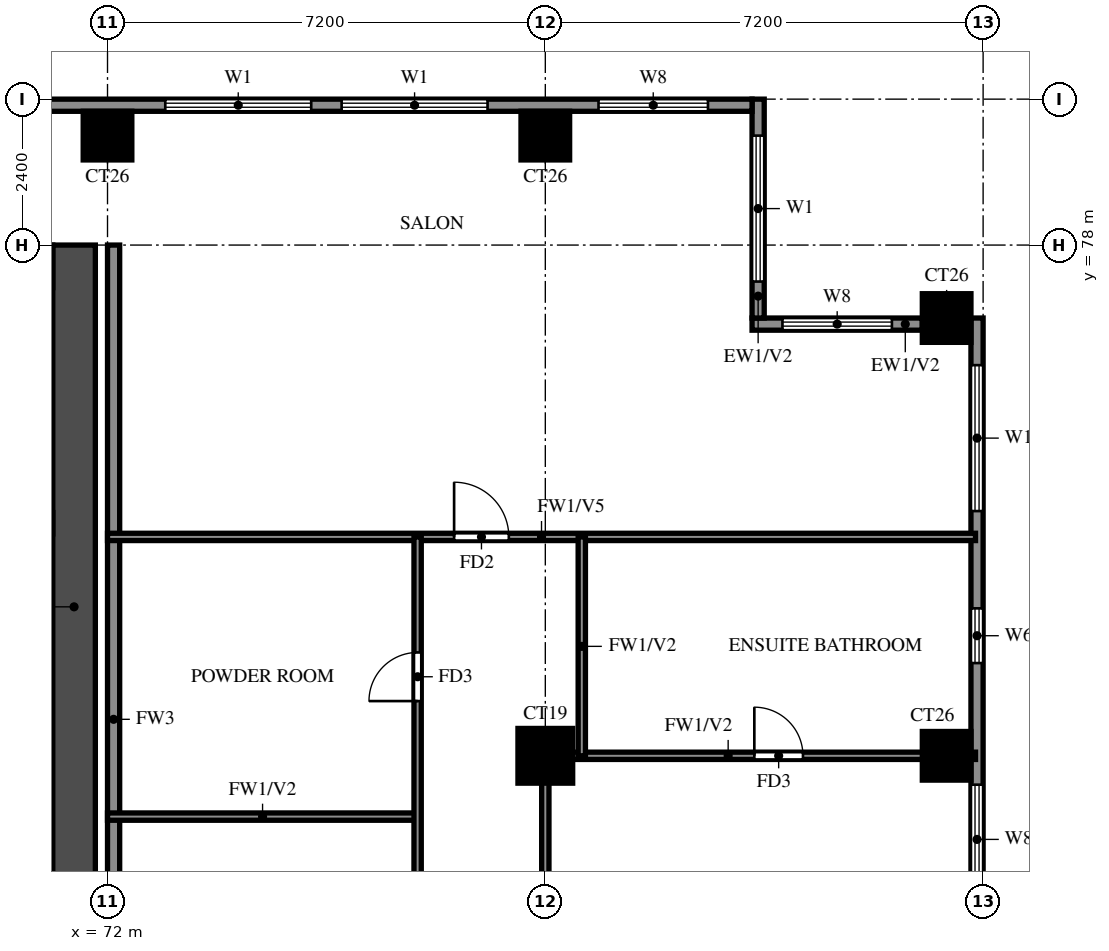
"""IFC4 building model, lengths in metres.
Left out: names, types, materials, properties, quantities, classifications, styles, units other than length and angle.
Written with IfcOpenShell. Run it as: python <this file> out.ifc"""

import sys

from ifc_helpers import new_model, si_unit, direction, frame, frame_2d, origin, origin_2d, place, context, subcontext, project, spatial, rectangle, extrude, source, transform, mapped, element, fill, save


model = new_model("IFC4")
c1 = context("Model", 3, precision=1e-05, world=origin(), true_north=direction((0.0, 1.0)))
c2 = subcontext(c1, "Body", "Model", "MODEL_VIEW")
j1 = project(units=[si_unit("LENGTHUNIT", "METRE"), si_unit("PLANEANGLEUNIT", "RADIAN")], contexts=[c1])
p1 = place(None, origin())
s1 = spatial("IfcSite", under=j1, at=p1, CompositionType="ELEMENT")
p2 = place(p1, origin())
s2 = spatial("IfcBuilding", under=s1, at=p2, CompositionType="ELEMENT")
p3 = place(p2, frame((0.0, 0.0, 174.5)))
s3 = spatial("IfcBuildingStorey", under=s2, at=p3, CompositionType="ELEMENT", Elevation=174.5)
m1 = source(origin(), c2, "Body", "SweptSolid", [
    extrude(rectangle(XDim=0.9, YDim=0.9, at=origin_2d()), origin(), (0.0, 0.0, 1.0), 3.2),
])
p4 = place(p3, frame((79.2, 69.6, 0.0), z_axis=(0.0, 0.0, 1.0), x_axis=(1.0, 0.0, 0.0)))
e1 = element("IfcColumn", 1, at=p4, inside=s3, PredefinedType="COLUMN", context=c2, shape_type="MappedRepresentation", body=[
    mapped(m1, transform((0.0, 0.0, 0.0))),
])
m2 = source(origin(), c2, "Body", "SweptSolid", [
    extrude(rectangle(XDim=0.8, YDim=0.8, at=origin_2d()), origin(), (0.0, 0.0, 1.0), 3.2),
])
for number, where, z_axis, x_axis in (
    (2, (85.8, 69.6, 0.0), (0.0, 0.0, 1.0), (1.0, 0.0, 0.0)),
    (3, (85.8, 76.8, 0.0), (0.0, 0.0, 1.0), (1.0, 0.0, 0.0)),
    (4, (72.0, 79.8, 0.0), (0.0, 0.0, 1.0), (1.0, 0.0, 0.0)),
    (5, (79.2, 79.8, 0.0), (0.0, 0.0, 1.0), (1.0, 0.0, 0.0)),
):
    element("IfcColumn", number, at=place(p3, frame(where, z_axis=z_axis, x_axis=x_axis)), inside=s3, PredefinedType="COLUMN", context=c2, shape_type="MappedRepresentation", body=[
        mapped(m2, transform((0.0, 0.0, 0.0))),
    ])
p5 = place(p3, frame((71.45, 66.1, 0.0), z_axis=(0.0, 0.0, 1.0), x_axis=(0.0, 1.0, 0.0)))
e6 = element("IfcWall", 6, at=p5, inside=s3, PredefinedType="SHEAR", context=c2, shape_type="SweptSolid", body=[
    extrude(rectangle(XDim=11.9, YDim=0.7, at=frame_2d((5.95, 0.0))), origin(), (0.0, 0.0, 1.0), 3.2),
])
p6 = place(p3, frame((29.7, 77.65, 0.0), z_axis=(0.0, 0.0, 1.0), x_axis=(1.0, 0.0, 0.0)))
e7 = element("IfcWall", 7, at=p6, inside=s3, PredefinedType="SHEAR", context=c2, shape_type="SweptSolid", body=[
    extrude(rectangle(XDim=41.4, YDim=0.7, at=frame_2d((20.7, 0.0))), origin(), (0.0, 0.0, 1.0), 3.2),
])
p7 = place(p3, frame((86.3, 48.2, 0.0), z_axis=(0.0, 0.0, 1.0), x_axis=(0.0, 1.0, 0.0)))
e8 = element("IfcWall", 8, at=p7, inside=s3, PredefinedType="SOLIDWALL", context=c2, shape_type="SweptSolid", body=[
    extrude(rectangle(XDim=28.6, YDim=0.2, at=frame_2d((14.3, 0.0))), origin(), (0.0, 0.0, 1.0), 3.2),
])
p8 = place(p7, frame((15.1, 0.0, 0.0)))
e9 = element("IfcOpeningElement", 9, at=p8, cuts=e8, PredefinedType="OPENING", context=c2, shape_type="SweptSolid", body=[
    extrude(rectangle(XDim=1.8, YDim=2.4, at=frame_2d((0.9, 1.2))), frame((0.0, 0.11, 0.0), z_axis=(0.0, -1.0, 0.0), x_axis=(1.0, 0.0, 0.0)), (0.0, 0.0, 1.0), 0.22),
])
p9 = place(p7, frame((0.783, 0.0, 0.6)))
e10 = element("IfcOpeningElement", 10, at=p9, cuts=e8, PredefinedType="OPENING", context=c2, shape_type="SweptSolid", body=[
    extrude(rectangle(XDim=2.4, YDim=2.4, at=frame_2d((1.2, 1.2))), frame((0.0, 0.11, 0.0), z_axis=(0.0, -1.0, 0.0), x_axis=(1.0, 0.0, 0.0)), (0.0, 0.0, 1.0), 0.22),
])
p10 = place(p7, frame((3.667, 0.0, 0.6)))
e11 = element("IfcOpeningElement", 11, at=p10, cuts=e8, PredefinedType="OPENING", context=c2, shape_type="SweptSolid", body=[
    extrude(rectangle(XDim=2.4, YDim=2.4, at=frame_2d((1.2, 1.2))), frame((0.0, 0.11, 0.0), z_axis=(0.0, -1.0, 0.0), x_axis=(1.0, 0.0, 0.0)), (0.0, 0.0, 1.0), 0.22),
])
p11 = place(p7, frame((7.775, 0.0, 0.6)))
e12 = element("IfcOpeningElement", 12, at=p11, cuts=e8, PredefinedType="OPENING", context=c2, shape_type="SweptSolid", body=[
    extrude(rectangle(XDim=2.4, YDim=2.4, at=frame_2d((1.2, 1.2))), frame((0.0, 0.11, 0.0), z_axis=(0.0, -1.0, 0.0), x_axis=(1.0, 0.0, 0.0)), (0.0, 0.0, 1.0), 0.22),
])
p12 = place(p7, frame((10.75, 0.0, 0.6)))
e13 = element("IfcOpeningElement", 13, at=p12, cuts=e8, PredefinedType="OPENING", context=c2, shape_type="SweptSolid", body=[
    extrude(rectangle(XDim=0.9, YDim=2.4, at=frame_2d((0.45, 1.2))), frame((0.0, 0.11, 0.0), z_axis=(0.0, -1.0, 0.0), x_axis=(1.0, 0.0, 0.0)), (0.0, 0.0, 1.0), 0.22),
])
p13 = place(p7, frame((12.525, 0.0, 0.6)))
e14 = element("IfcOpeningElement", 14, at=p13, cuts=e8, PredefinedType="OPENING", context=c2, shape_type="SweptSolid", body=[
    extrude(rectangle(XDim=1.2, YDim=2.4, at=frame_2d((0.6, 1.2))), frame((0.0, 0.11, 0.0), z_axis=(0.0, -1.0, 0.0), x_axis=(1.0, 0.0, 0.0)), (0.0, 0.0, 1.0), 0.22),
])
p14 = place(p7, frame((17.35, 0.0, 0.6)))
e15 = element("IfcOpeningElement", 15, at=p14, cuts=e8, PredefinedType="OPENING", context=c2, shape_type="SweptSolid", body=[
    extrude(rectangle(XDim=0.9, YDim=2.4, at=frame_2d((0.45, 1.2))), frame((0.0, 0.11, 0.0), z_axis=(0.0, -1.0, 0.0), x_axis=(1.0, 0.0, 0.0)), (0.0, 0.0, 1.0), 0.22),
])
p15 = place(p7, frame((19.125, 0.0, 0.6)))
e16 = element("IfcOpeningElement", 16, at=p15, cuts=e8, PredefinedType="OPENING", context=c2, shape_type="SweptSolid", body=[
    extrude(rectangle(XDim=1.8, YDim=2.4, at=frame_2d((0.9, 1.2))), frame((0.0, 0.11, 0.0), z_axis=(0.0, -1.0, 0.0), x_axis=(1.0, 0.0, 0.0)), (0.0, 0.0, 1.0), 0.22),
])
p16 = place(p7, frame((22.925, 0.0, 1.5)))
e17 = element("IfcOpeningElement", 17, at=p16, cuts=e8, PredefinedType="OPENING", context=c2, shape_type="SweptSolid", body=[
    extrude(rectangle(XDim=0.9, YDim=0.9, at=frame_2d((0.45, 0.45))), frame((0.0, 0.11, 0.0), z_axis=(0.0, -1.0, 0.0), x_axis=(1.0, 0.0, 0.0)), (0.0, 0.0, 1.0), 0.22),
])
p17 = place(p7, frame((25.425, 0.0, 0.6)))
e18 = element("IfcOpeningElement", 18, at=p17, cuts=e8, PredefinedType="OPENING", context=c2, shape_type="SweptSolid", body=[
    extrude(rectangle(XDim=2.4, YDim=2.4, at=frame_2d((1.2, 1.2))), frame((0.0, 0.11, 0.0), z_axis=(0.0, -1.0, 0.0), x_axis=(1.0, 0.0, 0.0)), (0.0, 0.0, 1.0), 0.22),
])
p18 = place(p3, frame((85.4, 76.7, 0.0), z_axis=(0.0, 0.0, 1.0), x_axis=(-1.0, 0.0, 0.0)))
e19 = element("IfcWall", 19, at=p18, inside=s3, PredefinedType="SOLIDWALL", context=c2, shape_type="SweptSolid", body=[
    extrude(rectangle(XDim=2.8, YDim=0.2, at=frame_2d((1.4, 0.0))), origin(), (0.0, 0.0, 1.0), 3.2),
])
p19 = place(p18, frame((0.5, 0.0, 0.6)))
e20 = element("IfcOpeningElement", 20, at=p19, cuts=e19, PredefinedType="OPENING", context=c2, shape_type="SweptSolid", body=[
    extrude(rectangle(XDim=1.8, YDim=2.4, at=frame_2d((0.9, 1.2))), frame((0.0, 0.11, 0.0), z_axis=(0.0, -1.0, 0.0), x_axis=(1.0, 0.0, 0.0)), (0.0, 0.0, 1.0), 0.22),
])
p20 = place(p3, frame((82.7, 76.8, 0.0), z_axis=(0.0, 0.0, 1.0), x_axis=(0.0, 1.0, 0.0)))
e21 = element("IfcWall", 21, at=p20, inside=s3, PredefinedType="SOLIDWALL", context=c2, shape_type="SweptSolid", body=[
    extrude(rectangle(XDim=3.6, YDim=0.2, at=frame_2d((1.8, 0.0))), origin(), (0.0, 0.0, 1.0), 3.2),
])
p21 = place(p20, frame((0.6, 0.0, 0.6)))
e22 = element("IfcOpeningElement", 22, at=p21, cuts=e21, PredefinedType="OPENING", context=c2, shape_type="SweptSolid", body=[
    extrude(rectangle(XDim=2.4, YDim=2.4, at=frame_2d((1.2, 1.2))), frame((0.0, 0.11, 0.0), z_axis=(0.0, -1.0, 0.0), x_axis=(1.0, 0.0, 0.0)), (0.0, 0.0, 1.0), 0.22),
])
p22 = place(p3, frame((82.6, 80.3, 0.0), z_axis=(0.0, 0.0, 1.0), x_axis=(-1.0, 0.0, 0.0)))
e23 = element("IfcWall", 23, at=p22, inside=s3, PredefinedType="SOLIDWALL", context=c2, shape_type="SweptSolid", body=[
    extrude(rectangle(XDim=64.6, YDim=0.2, at=frame_2d((32.3, 0.0))), origin(), (0.0, 0.0, 1.0), 3.2),
])
p23 = place(p22, frame((58.3, 0.0, 0.0)))
e24 = element("IfcOpeningElement", 24, at=p23, cuts=e23, PredefinedType="OPENING", context=c2, shape_type="SweptSolid", body=[
    extrude(rectangle(XDim=1.8, YDim=2.4, at=frame_2d((0.9, 1.2))), frame((0.0, 0.11, 0.0), z_axis=(0.0, -1.0, 0.0), x_axis=(1.0, 0.0, 0.0)), (0.0, 0.0, 1.0), 0.22),
])
p24 = place(p22, frame((54.275, 0.0, 0.6)))
e25 = element("IfcOpeningElement", 25, at=p24, cuts=e23, PredefinedType="OPENING", context=c2, shape_type="SweptSolid", body=[
    extrude(rectangle(XDim=1.8, YDim=2.4, at=frame_2d((0.9, 1.2))), frame((0.0, 0.11, 0.0), z_axis=(0.0, -1.0, 0.0), x_axis=(1.0, 0.0, 0.0)), (0.0, 0.0, 1.0), 0.22),
])
p25 = place(p22, frame((56.95, 0.0, 0.6)))
e26 = element("IfcOpeningElement", 26, at=p25, cuts=e23, PredefinedType="OPENING", context=c2, shape_type="SweptSolid", body=[
    extrude(rectangle(XDim=0.9, YDim=2.4, at=frame_2d((0.45, 1.2))), frame((0.0, 0.11, 0.0), z_axis=(0.0, -1.0, 0.0), x_axis=(1.0, 0.0, 0.0)), (0.0, 0.0, 1.0), 0.22),
])
p26 = place(p22, frame((61.475, 0.0, 0.6)))
e27 = element("IfcOpeningElement", 27, at=p26, cuts=e23, PredefinedType="OPENING", context=c2, shape_type="SweptSolid", body=[
    extrude(rectangle(XDim=1.2, YDim=2.4, at=frame_2d((0.6, 1.2))), frame((0.0, 0.11, 0.0), z_axis=(0.0, -1.0, 0.0), x_axis=(1.0, 0.0, 0.0)), (0.0, 0.0, 1.0), 0.22),
])
p27 = place(p22, frame((0.725, 0.0, 0.6)))
e28 = element("IfcOpeningElement", 28, at=p27, cuts=e23, PredefinedType="OPENING", context=c2, shape_type="SweptSolid", body=[
    extrude(rectangle(XDim=1.8, YDim=2.4, at=frame_2d((0.9, 1.2))), frame((0.0, 0.11, 0.0), z_axis=(0.0, -1.0, 0.0), x_axis=(1.0, 0.0, 0.0)), (0.0, 0.0, 1.0), 0.22),
])
p28 = place(p22, frame((4.35, 0.0, 0.6)))
e29 = element("IfcOpeningElement", 29, at=p28, cuts=e23, PredefinedType="OPENING", context=c2, shape_type="SweptSolid", body=[
    extrude(rectangle(XDim=2.4, YDim=2.4, at=frame_2d((1.2, 1.2))), frame((0.0, 0.11, 0.0), z_axis=(0.0, -1.0, 0.0), x_axis=(1.0, 0.0, 0.0)), (0.0, 0.0, 1.0), 0.22),
])
p29 = place(p22, frame((7.25, 0.0, 0.6)))
e30 = element("IfcOpeningElement", 30, at=p29, cuts=e23, PredefinedType="OPENING", context=c2, shape_type="SweptSolid", body=[
    extrude(rectangle(XDim=2.4, YDim=2.4, at=frame_2d((1.2, 1.2))), frame((0.0, 0.11, 0.0), z_axis=(0.0, -1.0, 0.0), x_axis=(1.0, 0.0, 0.0)), (0.0, 0.0, 1.0), 0.22),
])
p30 = place(p3, frame((72.1, 62.4, 0.0), z_axis=(0.0, 0.0, 1.0), x_axis=(0.0, 1.0, 0.0)))
e31 = element("IfcWall", 31, at=p30, inside=s3, PredefinedType="SOLIDWALL", context=c2, shape_type="SweptSolid", body=[
    extrude(rectangle(XDim=15.6, YDim=0.2, at=frame_2d((7.8, 0.0))), origin(), (0.0, 0.0, 1.0), 3.2),
])
p31 = place(p3, frame((72.0, 68.6, 0.0), z_axis=(0.0, 0.0, 1.0), x_axis=(1.0, 0.0, 0.0)))
e32 = element("IfcWall", 32, at=p31, inside=s3, PredefinedType="PARTITIONING", context=c2, shape_type="SweptSolid", body=[
    extrude(rectangle(XDim=5.1, YDim=0.12, at=frame_2d((2.55, 0.0))), origin(), (0.0, 0.0, 1.0), 3.2),
])
p32 = place(p3, frame((79.2, 69.6, 0.0), z_axis=(0.0, 0.0, 1.0), x_axis=(1.0, 0.0, 0.0)))
e33 = element("IfcWall", 33, at=p32, inside=s3, PredefinedType="PARTITIONING", context=c2, shape_type="SweptSolid", body=[
    extrude(rectangle(XDim=7.075, YDim=0.12, at=frame_2d((3.538, 0.0))), origin(), (0.0, 0.0, 1.0), 3.2),
])
p33 = place(p32, frame((3.438, 0.0, 0.0)))
e34 = element("IfcOpeningElement", 34, at=p33, cuts=e33, PredefinedType="OPENING", context=c2, shape_type="SweptSolid", body=[
    extrude(rectangle(XDim=0.8, YDim=2.1, at=frame_2d((0.4, 1.05))), frame((0.0, 0.07, 0.0), z_axis=(0.0, -1.0, 0.0), x_axis=(1.0, 0.0, 0.0)), (0.0, 0.0, 1.0), 0.14),
])
p34 = place(p3, frame((72.0, 73.2, 0.0), z_axis=(0.0, 0.0, 1.0), x_axis=(1.0, 0.0, 0.0)))
e35 = element("IfcWall", 35, at=p34, inside=s3, PredefinedType="PARTITIONING", context=c2, shape_type="SweptSolid", body=[
    extrude(rectangle(XDim=14.275, YDim=0.12, at=frame_2d((7.137, 0.0))), origin(), (0.0, 0.0, 1.0), 2.3),
])
p35 = place(p34, frame((5.7, 0.0, 0.0)))
e36 = element("IfcOpeningElement", 36, at=p35, cuts=e35, PredefinedType="OPENING", context=c2, shape_type="SweptSolid", body=[
    extrude(rectangle(XDim=0.9, YDim=2.1, at=frame_2d((0.45, 1.05))), frame((0.0, 0.07, 0.0), z_axis=(0.0, -1.0, 0.0), x_axis=(1.0, 0.0, 0.0)), (0.0, 0.0, 1.0), 0.14),
])
p36 = place(p3, frame((77.1, 61.2, 0.0), z_axis=(0.0, 0.0, 1.0), x_axis=(0.0, 1.0, 0.0)))
e37 = element("IfcWall", 37, at=p36, inside=s3, PredefinedType="PARTITIONING", context=c2, shape_type="SweptSolid", body=[
    extrude(rectangle(XDim=12.0, YDim=0.12, at=frame_2d((6.0, 0.0))), origin(), (0.0, 0.0, 1.0), 3.2),
])
p37 = place(p36, frame((4.55, 0.0, 0.0)))
e38 = element("IfcOpeningElement", 38, at=p37, cuts=e37, PredefinedType="OPENING", context=c2, shape_type="SweptSolid", body=[
    extrude(rectangle(XDim=0.9, YDim=2.1, at=frame_2d((0.45, 1.05))), frame((0.0, 0.07, 0.0), z_axis=(0.0, -1.0, 0.0), x_axis=(1.0, 0.0, 0.0)), (0.0, 0.0, 1.0), 0.14),
])
p38 = place(p36, frame((9.3, 0.0, 0.0)))
e39 = element("IfcOpeningElement", 39, at=p38, cuts=e37, PredefinedType="OPENING", context=c2, shape_type="SweptSolid", body=[
    extrude(rectangle(XDim=0.8, YDim=2.1, at=frame_2d((0.4, 1.05))), frame((0.0, 0.07, 0.0), z_axis=(0.0, -1.0, 0.0), x_axis=(1.0, 0.0, 0.0)), (0.0, 0.0, 1.0), 0.14),
])
p39 = place(p3, frame((79.2, 48.125, 0.0), z_axis=(0.0, 0.0, 1.0), x_axis=(0.0, 1.0, 0.0)))
e40 = element("IfcWall", 40, at=p39, inside=s3, PredefinedType="PARTITIONING", context=c2, shape_type="SweptSolid", body=[
    extrude(rectangle(XDim=21.475, YDim=0.12, at=frame_2d((10.738, 0.0))), origin(), (0.0, 0.0, 1.0), 3.2),
])
p40 = place(p39, frame((2.788, 0.0, 0.0)))
e41 = element("IfcOpeningElement", 41, at=p40, cuts=e40, PredefinedType="OPENING", context=c2, shape_type="SweptSolid", body=[
    extrude(rectangle(XDim=1.5, YDim=2.1, at=frame_2d((0.75, 1.05))), frame((0.0, 0.07, 0.0), z_axis=(0.0, -1.0, 0.0), x_axis=(1.0, 0.0, 0.0)), (0.0, 0.0, 1.0), 0.14),
])
p41 = place(p39, frame((8.425, 0.0, 0.0)))
e42 = element("IfcOpeningElement", 42, at=p41, cuts=e40, PredefinedType="OPENING", context=c2, shape_type="SweptSolid", body=[
    extrude(rectangle(XDim=0.9, YDim=2.1, at=frame_2d((0.45, 1.05))), frame((0.0, 0.07, 0.0), z_axis=(0.0, -1.0, 0.0), x_axis=(1.0, 0.0, 0.0)), (0.0, 0.0, 1.0), 0.14),
])
p42 = place(p39, frame((12.025, 0.0, 0.0)))
e43 = element("IfcOpeningElement", 43, at=p42, cuts=e40, PredefinedType="OPENING", context=c2, shape_type="SweptSolid", body=[
    extrude(rectangle(XDim=0.9, YDim=2.1, at=frame_2d((0.45, 1.05))), frame((0.0, 0.07, 0.0), z_axis=(0.0, -1.0, 0.0), x_axis=(1.0, 0.0, 0.0)), (0.0, 0.0, 1.0), 0.14),
])
p43 = place(p39, frame((17.425, 0.0, 0.0)))
e44 = element("IfcOpeningElement", 44, at=p43, cuts=e40, PredefinedType="OPENING", context=c2, shape_type="SweptSolid", body=[
    extrude(rectangle(XDim=0.9, YDim=2.1, at=frame_2d((0.45, 1.05))), frame((0.0, 0.07, 0.0), z_axis=(0.0, -1.0, 0.0), x_axis=(1.0, 0.0, 0.0)), (0.0, 0.0, 1.0), 0.14),
])
p44 = place(p3, frame((79.8, 69.6, 0.0), z_axis=(0.0, 0.0, 1.0), x_axis=(0.0, 1.0, 0.0)))
e45 = element("IfcWall", 45, at=p44, inside=s3, PredefinedType="PARTITIONING", context=c2, shape_type="SweptSolid", body=[
    extrude(rectangle(XDim=3.6, YDim=0.12, at=frame_2d((1.8, 0.0))), origin(), (0.0, 0.0, 1.0), 3.2),
])
p45 = place(p15, origin())
e46 = element("IfcWindow", 46, at=p45, inside=s3, PartitioningType="DOUBLE_PANEL_VERTICAL", PredefinedType="WINDOW", context=c2, shape_type="SweptSolid", body=[
    extrude(rectangle(XDim=1.8, YDim=2.4, at=frame_2d((0.9, 1.2))), frame((0.0, 0.03, 0.0), z_axis=(0.0, -1.0, 0.0), x_axis=(1.0, 0.0, 0.0)), (0.0, 0.0, 1.0), 0.06),
])
fill(e16, e46)
p46 = place(p16, origin())
e47 = element("IfcWindow", 47, at=p46, inside=s3, PartitioningType="SINGLE_PANEL", PredefinedType="WINDOW", context=c2, shape_type="SweptSolid", body=[
    extrude(rectangle(XDim=0.9, YDim=0.9, at=frame_2d((0.45, 0.45))), frame((0.0, 0.03, 0.0), z_axis=(0.0, -1.0, 0.0), x_axis=(1.0, 0.0, 0.0)), (0.0, 0.0, 1.0), 0.06),
])
fill(e17, e47)
p47 = place(p17, origin())
e48 = element("IfcWindow", 48, at=p47, inside=s3, PartitioningType="DOUBLE_PANEL_VERTICAL", PredefinedType="WINDOW", context=c2, shape_type="SweptSolid", body=[
    extrude(rectangle(XDim=2.4, YDim=2.4, at=frame_2d((1.2, 1.2))), frame((0.0, 0.03, 0.0), z_axis=(0.0, -1.0, 0.0), x_axis=(1.0, 0.0, 0.0)), (0.0, 0.0, 1.0), 0.06),
])
fill(e18, e48)
p48 = place(p19, origin())
e49 = element("IfcWindow", 49, at=p48, inside=s3, PartitioningType="DOUBLE_PANEL_VERTICAL", PredefinedType="WINDOW", context=c2, shape_type="SweptSolid", body=[
    extrude(rectangle(XDim=1.8, YDim=2.4, at=frame_2d((0.9, 1.2))), frame((0.0, 0.03, 0.0), z_axis=(0.0, -1.0, 0.0), x_axis=(1.0, 0.0, 0.0)), (0.0, 0.0, 1.0), 0.06),
])
fill(e20, e49)
p49 = place(p21, origin())
e50 = element("IfcWindow", 50, at=p49, inside=s3, PartitioningType="DOUBLE_PANEL_VERTICAL", PredefinedType="WINDOW", context=c2, shape_type="SweptSolid", body=[
    extrude(rectangle(XDim=2.4, YDim=2.4, at=frame_2d((1.2, 1.2))), frame((0.0, 0.03, 0.0), z_axis=(0.0, -1.0, 0.0), x_axis=(1.0, 0.0, 0.0)), (0.0, 0.0, 1.0), 0.06),
])
fill(e22, e50)
p50 = place(p27, origin())
e51 = element("IfcWindow", 51, at=p50, inside=s3, PartitioningType="DOUBLE_PANEL_VERTICAL", PredefinedType="WINDOW", context=c2, shape_type="SweptSolid", body=[
    extrude(rectangle(XDim=1.8, YDim=2.4, at=frame_2d((0.9, 1.2))), frame((0.0, 0.03, 0.0), z_axis=(0.0, -1.0, 0.0), x_axis=(1.0, 0.0, 0.0)), (0.0, 0.0, 1.0), 0.06),
])
fill(e28, e51)
p51 = place(p28, origin())
e52 = element("IfcWindow", 52, at=p51, inside=s3, PartitioningType="DOUBLE_PANEL_VERTICAL", PredefinedType="WINDOW", context=c2, shape_type="SweptSolid", body=[
    extrude(rectangle(XDim=2.4, YDim=2.4, at=frame_2d((1.2, 1.2))), frame((0.0, 0.03, 0.0), z_axis=(0.0, -1.0, 0.0), x_axis=(1.0, 0.0, 0.0)), (0.0, 0.0, 1.0), 0.06),
])
fill(e29, e52)
p52 = place(p29, origin())
e53 = element("IfcWindow", 53, at=p52, inside=s3, PartitioningType="DOUBLE_PANEL_VERTICAL", PredefinedType="WINDOW", context=c2, shape_type="SweptSolid", body=[
    extrude(rectangle(XDim=2.4, YDim=2.4, at=frame_2d((1.2, 1.2))), frame((0.0, 0.03, 0.0), z_axis=(0.0, -1.0, 0.0), x_axis=(1.0, 0.0, 0.0)), (0.0, 0.0, 1.0), 0.06),
])
fill(e30, e53)
p53 = place(p33, origin())
e54 = element("IfcDoor", 54, at=p53, inside=s3, OperationType="SINGLE_SWING_LEFT", PredefinedType="DOOR", context=c2, shape_type="SweptSolid", body=[
    extrude(rectangle(XDim=0.8, YDim=2.1, at=frame_2d((0.4, 1.05))), frame((0.0, 0.025, 0.0), z_axis=(0.0, -1.0, 0.0), x_axis=(1.0, 0.0, 0.0)), (0.0, 0.0, 1.0), 0.05),
])
fill(e34, e54)
p54 = place(p35, origin())
e55 = element("IfcDoor", 55, at=p54, inside=s3, OperationType="SINGLE_SWING_LEFT", PredefinedType="DOOR", context=c2, shape_type="SweptSolid", body=[
    extrude(rectangle(XDim=0.9, YDim=2.1, at=frame_2d((0.45, 1.05))), frame((0.0, 0.025, 0.0), z_axis=(0.0, -1.0, 0.0), x_axis=(1.0, 0.0, 0.0)), (0.0, 0.0, 1.0), 0.05),
])
fill(e36, e55)
p55 = place(p38, origin())
e56 = element("IfcDoor", 56, at=p55, inside=s3, OperationType="SINGLE_SWING_LEFT", PredefinedType="DOOR", context=c2, shape_type="SweptSolid", body=[
    extrude(rectangle(XDim=0.8, YDim=2.1, at=frame_2d((0.4, 1.05))), frame((0.0, 0.025, 0.0), z_axis=(0.0, -1.0, 0.0), x_axis=(1.0, 0.0, 0.0)), (0.0, 0.0, 1.0), 0.05),
])
fill(e39, e56)
save(model, sys.argv[1])
